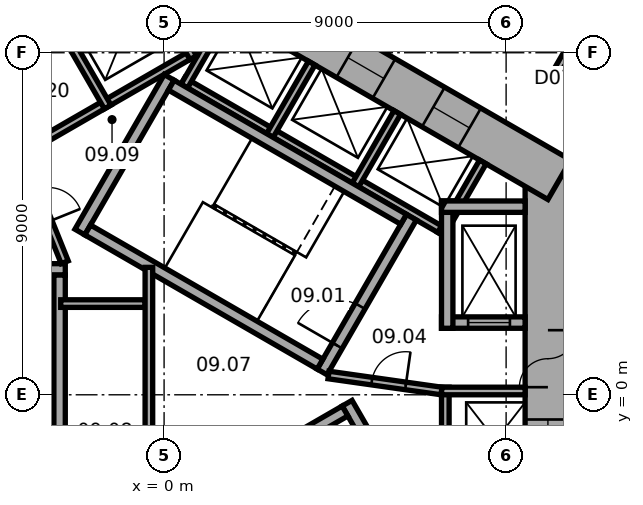
"""IFC4 building model, lengths in metres.
Left out: names, types, materials, properties, quantities, classifications, styles, units other than length and angle.
Written with IfcOpenShell. Run it as: python <this file> out.ifc"""

import sys

from ifc_helpers import new_model, si_unit, direction, frame, frame_2d, origin, place, context, subcontext, project, spatial, rectangle, extrude, element, fill, save


model = new_model("IFC4")
c1 = context("Model", 3, precision=1e-05, world=origin(), true_north=direction((0.0, 1.0)))
c2 = subcontext(c1, "Body", "Model", "MODEL_VIEW")
j1 = project(units=[si_unit("LENGTHUNIT", "METRE"), si_unit("PLANEANGLEUNIT", "RADIAN")], contexts=[c1])
p1 = place(None, origin())
s1 = spatial("IfcSite", under=j1, at=p1, CompositionType="ELEMENT")
p2 = place(p1, origin())
s2 = spatial("IfcBuilding", under=s1, at=p2, CompositionType="ELEMENT")
p3 = place(p2, frame((0.0, 0.0, 50.6)))
s3 = spatial("IfcBuildingStorey", under=s2, at=p3, CompositionType="ELEMENT", Elevation=50.6)
p4 = place(p3, frame((10.1, -6.177, 0.0), z_axis=(0.0, 0.0, 1.0), x_axis=(0.0, 1.0, 0.0)))
e1 = element("IfcWall", 1, at=p4, inside=s3, PredefinedType="SHEAR", context=c2, shape_type="SweptSolid", body=[
    extrude(rectangle(XDim=12.355, YDim=1.2, at=frame_2d((6.177, 0.0))), origin(), (0.0, 0.0, 1.0), 3.3),
])
p5 = place(p4, frame((6.378, 0.0, 0.0)))
e2 = element("IfcOpeningElement", 2, at=p5, cuts=e1, PredefinedType="OPENING", context=c2, shape_type="SweptSolid", body=[
    extrude(rectangle(XDim=1.5, YDim=2.1, at=frame_2d((0.75, 1.05))), frame((0.0, 0.61, 0.0), z_axis=(0.0, -1.0, 0.0), x_axis=(1.0, 0.0, 0.0)), (0.0, 0.0, 1.0), 1.22),
])
p6 = place(p4, frame((1.828, 0.0, 0.0)))
e3 = element("IfcOpeningElement", 3, at=p6, cuts=e1, PredefinedType="OPENING", context=c2, shape_type="SweptSolid", body=[
    extrude(rectangle(XDim=1.1, YDim=2.1, at=frame_2d((0.55, 1.05))), frame((0.0, 0.61, 0.0), z_axis=(0.0, -1.0, 0.0), x_axis=(1.0, 0.0, 0.0)), (0.0, 0.0, 1.0), 1.22),
])
p7 = place(p4, frame((4.427, 0.0, 0.0)))
e4 = element("IfcOpeningElement", 4, at=p7, cuts=e1, PredefinedType="OPENING", context=c2, shape_type="SweptSolid", body=[
    extrude(rectangle(XDim=1.1, YDim=2.1, at=frame_2d((0.55, 1.05))), frame((0.0, 0.61, 0.0), z_axis=(0.0, -1.0, 0.0), x_axis=(1.0, 0.0, 0.0)), (0.0, 0.0, 1.0), 1.22),
])
p8 = place(p3, frame((10.4, 5.658, 0.0), z_axis=(0.0, 0.0, 1.0), x_axis=(-0.866021384402, 0.500006961711, 0.0)))
e5 = element("IfcWall", 5, at=p8, inside=s3, PredefinedType="SHEAR", context=c2, shape_type="SweptSolid", body=[
    extrude(rectangle(XDim=12.355, YDim=1.2, at=frame_2d((6.178, 0.0))), origin(), (0.0, 0.0, 1.0), 3.3),
])
p9 = place(p8, frame((2.728, 0.0, 0.0)))
e6 = element("IfcOpeningElement", 6, at=p9, cuts=e5, PredefinedType="OPENING", context=c2, shape_type="SweptSolid", body=[
    extrude(rectangle(XDim=1.1, YDim=2.1, at=frame_2d((0.55, 1.05))), frame((0.0, 0.61, 0.0), z_axis=(0.0, -1.0, 0.0), x_axis=(1.0, 0.0, 0.0)), (0.0, 0.0, 1.0), 1.22),
])
p10 = place(p8, frame((5.328, 0.0, 0.0)))
e7 = element("IfcOpeningElement", 7, at=p10, cuts=e5, PredefinedType="OPENING", context=c2, shape_type="SweptSolid", body=[
    extrude(rectangle(XDim=1.1, YDim=2.1, at=frame_2d((0.55, 1.05))), frame((0.0, 0.61, 0.0), z_axis=(0.0, -1.0, 0.0), x_axis=(1.0, 0.0, 0.0)), (0.0, 0.0, 1.0), 1.22),
])
p11 = place(p8, frame((7.928, 0.0, 0.0)))
e8 = element("IfcOpeningElement", 8, at=p11, cuts=e5, PredefinedType="OPENING", context=c2, shape_type="SweptSolid", body=[
    extrude(rectangle(XDim=1.1, YDim=2.1, at=frame_2d((0.55, 1.05))), frame((0.0, 0.61, 0.0), z_axis=(0.0, -1.0, 0.0), x_axis=(1.0, 0.0, 0.0)), (0.0, 0.0, 1.0), 1.22),
])
p12 = place(p3, frame((0.3, 11.836, 0.0), z_axis=(0.0, 0.0, 1.0), x_axis=(-0.866021384402, -0.500006961711, 0.0)))
e9 = element("IfcWall", 9, at=p12, inside=s3, PredefinedType="SHEAR", context=c2, shape_type="SweptSolid", body=[
    extrude(rectangle(XDim=12.355, YDim=1.2, at=frame_2d((6.178, 0.0))), origin(), (0.0, 0.0, 1.0), 3.3),
])
p13 = place(p12, frame((6.378, 0.0, 0.0)))
e10 = element("IfcOpeningElement", 10, at=p13, cuts=e9, PredefinedType="OPENING", context=c2, shape_type="SweptSolid", body=[
    extrude(rectangle(XDim=1.5, YDim=2.1, at=frame_2d((0.75, 1.05))), frame((0.0, 0.61, 0.0), z_axis=(0.0, -1.0, 0.0), x_axis=(1.0, 0.0, 0.0)), (0.0, 0.0, 1.0), 1.22),
])
p14 = place(p12, frame((1.828, 0.0, 0.0)))
e11 = element("IfcOpeningElement", 11, at=p14, cuts=e9, PredefinedType="OPENING", context=c2, shape_type="SweptSolid", body=[
    extrude(rectangle(XDim=1.1, YDim=2.1, at=frame_2d((0.55, 1.05))), frame((0.0, 0.61, 0.0), z_axis=(0.0, -1.0, 0.0), x_axis=(1.0, 0.0, 0.0)), (0.0, 0.0, 1.0), 1.22),
])
p15 = place(p3, frame((7.4, -5.2, 0.0), z_axis=(0.0, 0.0, 1.0), x_axis=(0.0, 1.0, 0.0)))
e12 = element("IfcWall", 12, at=p15, inside=s3, PredefinedType="PARTITIONING", context=c2, shape_type="SweptSolid", body=[
    extrude(rectangle(XDim=5.4, YDim=0.2, at=frame_2d((2.7, 0.0))), origin(), (0.0, 0.0, 1.0), 3.05),
])
p16 = place(p3, frame((7.3, 0.1, 0.0), z_axis=(0.0, 0.0, 1.0), x_axis=(1.0, 0.0, 0.0)))
e13 = element("IfcWall", 13, at=p16, inside=s3, PredefinedType="PARTITIONING", context=c2, shape_type="SweptSolid", body=[
    extrude(rectangle(XDim=2.2, YDim=0.2, at=frame_2d((1.1, 0.0))), origin(), (0.0, 0.0, 1.0), 3.05),
])
p17 = place(p3, frame((7.424, 4.259, 0.0), z_axis=(0.0, 0.0, 1.0), x_axis=(-0.866026010844, 0.49999894854, 0.0)))
e14 = element("IfcWall", 14, at=p17, inside=s3, PredefinedType="PARTITIONING", context=c2, shape_type="SweptSolid", body=[
    extrude(rectangle(XDim=8.0, YDim=0.2, at=frame_2d((4.0, 0.0))), origin(), (0.0, 0.0, 1.0), 3.05),
])
for number, where, z_axis, x_axis in (
    (15, (7.287, 4.222, 0.0), (0.0, 0.0, 1.0), (0.5, 0.866, 0.0)),
    (16, (5.036, 5.522, 0.0), (0.0, 0.0, 1.0), (0.5, 0.866, 0.0)),
    (17, (2.784, 6.822, 0.0), (0.0, 0.0, 1.0), (0.5, 0.866, 0.0)),
    (18, (0.532, 8.122, 0.0), (0.0, 0.0, 1.0), (0.5, 0.866, 0.0)),
):
    element("IfcWall", number, at=place(p3, frame(where, z_axis=z_axis, x_axis=x_axis)), inside=s3, PredefinedType="PARTITIONING", context=c2, shape_type="SweptSolid", body=[
        extrude(rectangle(XDim=2.2, YDim=0.2, at=frame_2d((1.1, 0.0))), origin(), (0.0, 0.0, 1.0), 3.05),
    ])
p18 = place(p3, frame((0.803, 9.009, 0.0), z_axis=(0.0, 0.0, 1.0), x_axis=(-0.866028230842, -0.499995103361, 0.0)))
e19 = element("IfcWall", 19, at=p18, inside=s3, PredefinedType="PARTITIONING", context=c2, shape_type="SweptSolid", body=[
    extrude(rectangle(XDim=5.4, YDim=0.2, at=frame_2d((2.7, 0.0))), origin(), (0.0, 0.0, 1.0), 3.05),
])
p19 = place(p3, frame((0.767, 8.872, 0.0), z_axis=(0.0, 0.0, 1.0), x_axis=(-0.499994660107, 0.866028486751, 0.0)))
e20 = element("IfcWall", 20, at=p19, inside=s3, PredefinedType="PARTITIONING", context=c2, shape_type="SweptSolid", body=[
    extrude(rectangle(XDim=2.2, YDim=0.2, at=frame_2d((1.1, 0.0))), origin(), (0.0, 0.0, 1.0), 3.05),
])
p20 = place(p3, frame((-1.485, 7.572, 0.0), z_axis=(0.0, 0.0, 1.0), x_axis=(-0.50002983664, 0.866008176907, 0.0)))
e21 = element("IfcWall", 21, at=p20, inside=s3, PredefinedType="PARTITIONING", context=c2, shape_type="SweptSolid", body=[
    extrude(rectangle(XDim=2.2, YDim=0.2, at=frame_2d((1.1, 0.0))), origin(), (0.0, 0.0, 1.0), 3.05),
])
p21 = place(p3, frame((4.158, 0.602, 0.0), z_axis=(0.0, 0.0, 1.0), x_axis=(0.499977259774, 0.866038532462, 0.0)))
e22 = element("IfcWall", 22, at=p21, inside=s3, PredefinedType="SHEAR", context=c2, shape_type="SweptSolid", body=[
    extrude(rectangle(XDim=4.7, YDim=0.3, at=frame_2d((2.35, 0.0))), origin(), (0.0, 0.0, 1.0), 3.05),
])
p22 = place(p21, frame((0.8, 0.0, 0.0)))
e23 = element("IfcOpeningElement", 23, at=p22, cuts=e22, PredefinedType="OPENING", context=c2, shape_type="SweptSolid", body=[
    extrude(rectangle(XDim=1.2, YDim=2.1, at=frame_2d((0.6, 1.05))), frame((0.0, 0.16, 0.0), z_axis=(0.0, -1.0, 0.0), x_axis=(1.0, 0.0, 0.0)), (0.0, 0.0, 1.0), 0.32),
])
p23 = place(p3, frame((-2.216, 4.282, 0.0), z_axis=(0.0, 0.0, 1.0), x_axis=(0.499977259774, 0.866038532462, 0.0)))
e24 = element("IfcWall", 24, at=p23, inside=s3, PredefinedType="SHEAR", context=c2, shape_type="SweptSolid", body=[
    extrude(rectangle(XDim=4.7, YDim=0.3, at=frame_2d((2.35, 0.0))), origin(), (0.0, 0.0, 1.0), 3.05),
])
for number, where, z_axis, x_axis in (
    (25, (4.103, 0.807, 0.0), (0.0, 0.0, 1.0), (-0.866, 0.5, 0.0)),
    (26, (6.303, 4.617, 0.0), (0.0, 0.0, 1.0), (-0.866, 0.5, 0.0)),
):
    element("IfcWall", number, at=place(p3, frame(where, z_axis=z_axis, x_axis=x_axis)), inside=s3, PredefinedType="SHEAR", context=c2, shape_type="SweptSolid", body=[
        extrude(rectangle(XDim=7.06, YDim=0.3, at=frame_2d((3.53, 0.0))), origin(), (0.0, 0.0, 1.0), 3.05),
    ])
p24 = place(p3, frame((-2.6, 3.3, 0.0), z_axis=(0.0, 0.0, 1.0), x_axis=(-1.0, 0.0, 0.0)))
e27 = element("IfcWall", 27, at=p24, inside=s3, PredefinedType="SHEAR", context=c2, shape_type="SweptSolid", body=[
    extrude(rectangle(XDim=4.7, YDim=0.3, at=frame_2d((2.35, 0.0))), origin(), (0.0, 0.0, 1.0), 3.05),
])
p25 = place(p24, frame((0.8, 0.0, 0.0)))
e28 = element("IfcOpeningElement", 28, at=p25, cuts=e27, PredefinedType="OPENING", context=c2, shape_type="SweptSolid", body=[
    extrude(rectangle(XDim=1.2, YDim=2.1, at=frame_2d((0.6, 1.05))), frame((0.0, 0.16, 0.0), z_axis=(0.0, -1.0, 0.0), x_axis=(1.0, 0.0, 0.0)), (0.0, 0.0, 1.0), 0.32),
])
p26 = place(p3, frame((-2.75, 3.15, 0.0), z_axis=(0.0, 0.0, 1.0), x_axis=(0.0, -1.0, 0.0)))
e29 = element("IfcWall", 29, at=p26, inside=s3, PredefinedType="SHEAR", context=c2, shape_type="SweptSolid", body=[
    extrude(rectangle(XDim=7.06, YDim=0.3, at=frame_2d((3.53, 0.0))), origin(), (0.0, 0.0, 1.0), 3.05),
])
p27 = place(p3, frame((4.816, -0.222, 0.0), z_axis=(0.0, 0.0, 1.0), x_axis=(0.499977259774, -0.866038532462, 0.0)))
e30 = element("IfcWall", 30, at=p27, inside=s3, PredefinedType="SHEAR", context=c2, shape_type="SweptSolid", body=[
    extrude(rectangle(XDim=4.7, YDim=0.3, at=frame_2d((2.35, 0.0))), origin(), (0.0, 0.0, 1.0), 3.05),
])
p28 = place(p3, frame((-1.353, -3.957, 0.0), z_axis=(0.0, 0.0, 1.0), x_axis=(0.866027801685, 0.499995846692, 0.0)))
e31 = element("IfcWall", 31, at=p28, inside=s3, PredefinedType="SHEAR", context=c2, shape_type="SweptSolid", body=[
    extrude(rectangle(XDim=7.06, YDim=0.3, at=frame_2d((3.53, 0.0))), origin(), (0.0, 0.0, 1.0), 3.05),
])
p29 = place(p3, frame((7.3, 1.9, 0.0), z_axis=(0.0, 0.0, 1.0), x_axis=(1.0, 0.0, 0.0)))
e32 = element("IfcWall", 32, at=p29, inside=s3, PredefinedType="SHEAR", context=c2, shape_type="SweptSolid", body=[
    extrude(rectangle(XDim=2.2, YDim=0.3, at=frame_2d((1.1, 0.0))), origin(), (0.0, 0.0, 1.0), 3.05),
])
p30 = place(p29, frame((0.7, 0.0, 0.0)))
e33 = element("IfcOpeningElement", 33, at=p30, cuts=e32, PredefinedType="OPENING", context=c2, shape_type="SweptSolid", body=[
    extrude(rectangle(XDim=1.1, YDim=2.1, at=frame_2d((0.55, 1.05))), frame((0.0, 0.16, 0.0), z_axis=(0.0, -1.0, 0.0), x_axis=(1.0, 0.0, 0.0)), (0.0, 0.0, 1.0), 0.32),
])
p31 = place(p3, frame((7.45, 1.75, 0.0), z_axis=(0.0, 0.0, 1.0), x_axis=(0.0, 1.0, 0.0)))
e34 = element("IfcWall", 34, at=p31, inside=s3, PredefinedType="SHEAR", context=c2, shape_type="SweptSolid", body=[
    extrude(rectangle(XDim=3.35, YDim=0.3, at=frame_2d((1.675, 0.0))), origin(), (0.0, 0.0, 1.0), 3.05),
])
p32 = place(p3, frame((7.3, 4.95, 0.0), z_axis=(0.0, 0.0, 1.0), x_axis=(1.0, 0.0, 0.0)))
e35 = element("IfcWall", 35, at=p32, inside=s3, PredefinedType="SHEAR", context=c2, shape_type="SweptSolid", body=[
    extrude(rectangle(XDim=2.2, YDim=0.3, at=frame_2d((1.1, 0.0))), origin(), (0.0, 0.0, 1.0), 3.05),
])
p33 = place(p3, frame((4.327, 0.521, 0.0), z_axis=(0.0, 0.0, 1.0), x_axis=(0.990124376366, -0.14019172346, 0.0)))
e36 = element("IfcWall", 36, at=p33, inside=s3, PredefinedType="PARTITIONING", context=c2, shape_type="SweptSolid", body=[
    extrude(rectangle(XDim=3.002, YDim=0.2, at=frame_2d((1.501, 0.0))), origin(), (0.0, 0.0, 1.0), 3.05),
])
p34 = place(p33, frame((1.15, 0.0, 0.0)))
e37 = element("IfcOpeningElement", 37, at=p34, cuts=e36, PredefinedType="OPENING", context=c2, shape_type="SweptSolid", body=[
    extrude(rectangle(XDim=0.9, YDim=2.1, at=frame_2d((0.45, 1.05))), frame((0.0, 0.11, 0.0), z_axis=(0.0, -1.0, 0.0), x_axis=(1.0, 0.0, 0.0)), (0.0, 0.0, 1.0), 0.22),
])
p35 = place(p3, frame((-2.615, 3.487, 0.0), z_axis=(0.0, 0.0, 1.0), x_axis=(-0.373576831041, 0.92759924068, 0.0)))
e38 = element("IfcWall", 38, at=p35, inside=s3, PredefinedType="PARTITIONING", context=c2, shape_type="SweptSolid", body=[
    extrude(rectangle(XDim=3.002, YDim=0.2, at=frame_2d((1.501, 0.0))), origin(), (0.0, 0.0, 1.0), 3.05),
])
p36 = place(p35, frame((1.15, 0.0, 0.0)))
e39 = element("IfcOpeningElement", 39, at=p36, cuts=e38, PredefinedType="OPENING", context=c2, shape_type="SweptSolid", body=[
    extrude(rectangle(XDim=0.9, YDim=2.1, at=frame_2d((0.45, 1.05))), frame((0.0, 0.11, 0.0), z_axis=(0.0, -1.0, 0.0), x_axis=(1.0, 0.0, 0.0)), (0.0, 0.0, 1.0), 0.22),
])
p37 = place(p3, frame((-2.72, 2.4, 0.0), z_axis=(0.0, 0.0, 1.0), x_axis=(1.0, 0.0, 0.0)))
e40 = element("IfcWall", 40, at=p37, inside=s3, PredefinedType="PARTITIONING", context=c2, shape_type="SweptSolid", body=[
    extrude(rectangle(XDim=2.22, YDim=0.2, at=frame_2d((1.11, 0.0))), origin(), (0.0, 0.0, 1.0), 3.05),
])
p38 = place(p3, frame((-0.4, -3.353, 0.0), z_axis=(0.0, 0.0, 1.0), x_axis=(0.0, 1.0, 0.0)))
e41 = element("IfcWall", 41, at=p38, inside=s3, PredefinedType="PARTITIONING", context=c2, shape_type="SweptSolid", body=[
    extrude(rectangle(XDim=6.707, YDim=0.2, at=frame_2d((3.353, 0.0))), origin(), (0.0, 0.0, 1.0), 3.05),
])
p39 = place(p3, frame((10.371, 8.561, 0.0), z_axis=(0.0, 0.0, 1.0), x_axis=(0.499986357472, 0.866033280158, 0.0)))
e42 = element("IfcWall", 42, at=p39, inside=s3, PredefinedType="PARTITIONING", context=c2, shape_type="SweptSolid", body=[
    extrude(rectangle(XDim=1.201, YDim=0.2, at=frame_2d((0.601, 0.0))), origin(), (0.0, 0.0, 1.0), 3.05),
])
p40 = place(p3, frame((11.566, 7.871, 0.0), z_axis=(0.0, 0.0, 1.0), x_axis=(-0.866004557827, 0.500036104519, 0.0)))
e43 = element("IfcWall", 43, at=p40, inside=s3, PredefinedType="PARTITIONING", context=c2, shape_type="SweptSolid", body=[
    extrude(rectangle(XDim=1.28, YDim=0.2, at=frame_2d((0.64, 0.0))), origin(), (0.0, 0.0, 1.0), 3.05),
])
p41 = place(p40, frame((0.19, 0.0, 0.0)))
e44 = element("IfcOpeningElement", 44, at=p41, cuts=e43, PredefinedType="OPENING", context=c2, shape_type="SweptSolid", body=[
    extrude(rectangle(XDim=0.9, YDim=2.1, at=frame_2d((0.45, 1.05))), frame((0.0, 0.11, 0.0), z_axis=(0.0, -1.0, 0.0), x_axis=(1.0, 0.0, 0.0)), (0.0, 0.0, 1.0), 0.22),
])
p42 = place(p5, origin())
e45 = element("IfcDoor", 45, at=p42, inside=s3, OperationType="DOUBLE_DOOR_SINGLE_SWING", PredefinedType="DOOR", context=c2, shape_type="SweptSolid", body=[
    extrude(rectangle(XDim=1.5, YDim=2.1, at=frame_2d((0.75, 1.05))), frame((0.0, 0.025, 0.0), z_axis=(0.0, -1.0, 0.0), x_axis=(1.0, 0.0, 0.0)), (0.0, 0.0, 1.0), 0.05),
])
fill(e2, e45)
p43 = place(p22, origin())
e46 = element("IfcDoor", 46, at=p43, inside=s3, OperationType="SINGLE_SWING_RIGHT", PredefinedType="DOOR", context=c2, shape_type="SweptSolid", body=[
    extrude(rectangle(XDim=1.2, YDim=2.1, at=frame_2d((0.6, 1.05))), frame((0.0, 0.025, 0.0), z_axis=(0.0, -1.0, 0.0), x_axis=(1.0, 0.0, 0.0)), (0.0, 0.0, 1.0), 0.05),
])
fill(e23, e46)
p44 = place(p34, origin())
e47 = element("IfcDoor", 47, at=p44, inside=s3, OperationType="SINGLE_SWING_LEFT", PredefinedType="DOOR", context=c2, shape_type="SweptSolid", body=[
    extrude(rectangle(XDim=0.9, YDim=2.1, at=frame_2d((0.45, 1.05))), frame((0.0, 0.025, 0.0), z_axis=(0.0, -1.0, 0.0), x_axis=(1.0, 0.0, 0.0)), (0.0, 0.0, 1.0), 0.05),
])
fill(e37, e47)
p45 = place(p30, origin())
e48 = element("IfcDoor", 48, at=p45, inside=s3, OperationType="DOUBLE_DOOR_SLIDING", PredefinedType="DOOR", context=c2, shape_type="SweptSolid", body=[
    extrude(rectangle(XDim=1.1, YDim=2.1, at=frame_2d((0.55, 1.05))), frame((0.0, 0.025, 0.0), z_axis=(0.0, -1.0, 0.0), x_axis=(1.0, 0.0, 0.0)), (0.0, 0.0, 1.0), 0.05),
])
fill(e33, e48)
p46 = place(p7, origin())
e49 = element("IfcDoor", 49, at=p46, inside=s3, OperationType="DOUBLE_DOOR_SLIDING", PredefinedType="DOOR", context=c2, shape_type="SweptSolid", body=[
    extrude(rectangle(XDim=1.1, YDim=2.1, at=frame_2d((0.55, 1.05))), frame((0.0, 0.025, 0.0), z_axis=(0.0, -1.0, 0.0), x_axis=(1.0, 0.0, 0.0)), (0.0, 0.0, 1.0), 0.05),
])
fill(e4, e49)
p47 = place(p9, origin())
e50 = element("IfcDoor", 50, at=p47, inside=s3, OperationType="DOUBLE_DOOR_SLIDING", PredefinedType="DOOR", context=c2, shape_type="SweptSolid", body=[
    extrude(rectangle(XDim=1.1, YDim=2.1, at=frame_2d((0.55, 1.05))), frame((0.0, 0.025, 0.0), z_axis=(0.0, -1.0, 0.0), x_axis=(1.0, 0.0, 0.0)), (0.0, 0.0, 1.0), 0.05),
])
fill(e6, e50)
p48 = place(p10, origin())
e51 = element("IfcDoor", 51, at=p48, inside=s3, OperationType="DOUBLE_DOOR_SLIDING", PredefinedType="DOOR", context=c2, shape_type="SweptSolid", body=[
    extrude(rectangle(XDim=1.1, YDim=2.1, at=frame_2d((0.55, 1.05))), frame((0.0, 0.025, 0.0), z_axis=(0.0, -1.0, 0.0), x_axis=(1.0, 0.0, 0.0)), (0.0, 0.0, 1.0), 0.05),
])
fill(e7, e51)
save(model, sys.argv[1])
